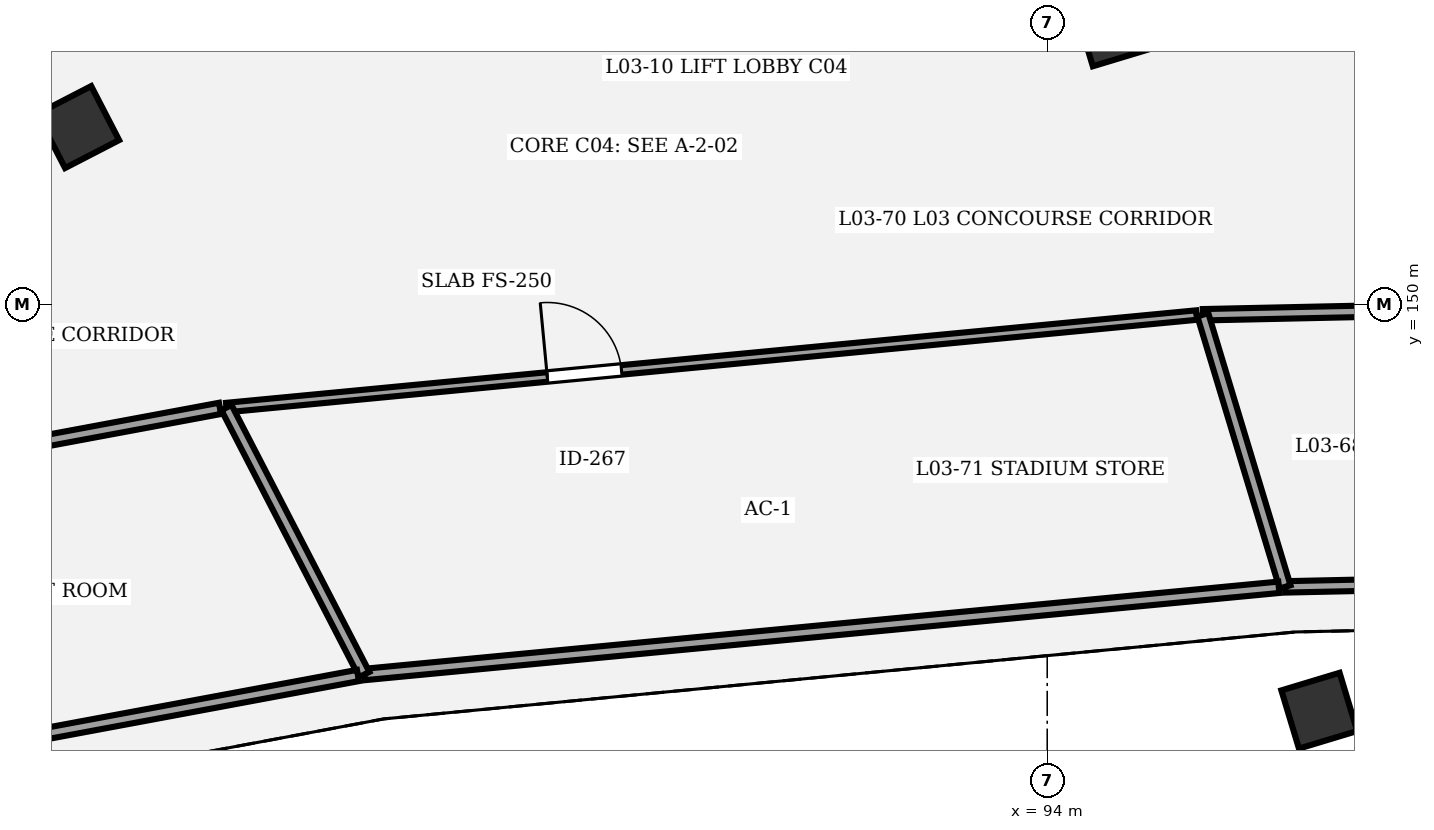
"""IFC4 building model, lengths in metres.
Left out: names, types, materials, properties, quantities, classifications, styles, units other than length and angle.
Written with IfcOpenShell. Run it as: python <this file> out.ifc"""

import sys

from ifc_helpers import new_model, si_unit, direction, frame, frame_2d, origin, origin_2d, place, context, subcontext, project, spatial, rectangle, extrude, element, fill, save


model = new_model("IFC4")
c1 = context("Model", 3, precision=1e-05, world=origin(), true_north=direction((0.0, 1.0)))
c2 = subcontext(c1, "Body", "Model", "MODEL_VIEW")
j1 = project(units=[si_unit("LENGTHUNIT", "METRE"), si_unit("PLANEANGLEUNIT", "RADIAN")], contexts=[c1])
p1 = place(None, origin())
s1 = spatial("IfcSite", under=j1, at=p1, CompositionType="ELEMENT")
p2 = place(p1, origin())
s2 = spatial("IfcBuilding", under=s1, at=p2, CompositionType="ELEMENT")
p3 = place(p2, frame((0.0, 0.0, 14.7)))
s3 = spatial("IfcBuildingStorey", under=s2, at=p3, CompositionType="ELEMENT", Elevation=14.7)
p4 = place(p3, frame((97.58, 144.657, 0.0), z_axis=(0.0, 0.0, 1.0), x_axis=(-0.289198876314, 0.957269037387, 0.0)))
e1 = element("IfcColumn", 1, at=p4, inside=s3, PredefinedType="COLUMN", context=c2, shape_type="SweptSolid", body=[
    extrude(rectangle(XDim=0.8, YDim=0.8, at=origin_2d()), origin(), (0.0, 0.0, 1.0), 2.85),
])
for number, where, z_axis, x_axis in (
    (2, (94.867, 153.634, 0.0), (0.0, 0.0, 1.0), (-0.289, 0.957, 0.0)),
    (3, (81.25, 152.335, 0.0), (0.0, 0.0, 1.0), (-0.459, 0.888, 0.0)),
):
    element("IfcColumn", number, at=place(p3, frame(where, z_axis=z_axis, x_axis=x_axis)), inside=s3, PredefinedType="COLUMN", context=c2, shape_type="SweptSolid", body=[
        extrude(rectangle(XDim=0.8, YDim=0.8, at=origin_2d()), origin(), (0.0, 0.0, 1.0), 4.5),
    ])
p5 = place(p3, frame((96.047, 149.866, 0.0), z_axis=(0.0, 0.0, 1.0), x_axis=(0.999768266483, 0.021527037261, 0.0)))
e4 = element("IfcWall", 4, at=p5, inside=s3, PredefinedType="PARTITIONING", context=c2, shape_type="SweptSolid", body=[
    extrude(rectangle(XDim=18.917, YDim=0.15, at=frame_2d((9.458, 0.0))), origin(), (0.0, 0.0, 1.0), 3.25),
])
p6 = place(p5, frame((9.009, 0.0, 0.0)))
e5 = element("IfcOpeningElement", 5, at=p6, cuts=e4, PredefinedType="OPENING", context=c2, shape_type="SweptSolid", body=[
    extrude(rectangle(XDim=0.9, YDim=2.2, at=frame_2d((0.45, 1.1))), frame((0.0, 0.085, 0.0), z_axis=(0.0, -1.0, 0.0), x_axis=(1.0, 0.0, 0.0)), (0.0, 0.0, 1.0), 0.17),
])
p7 = place(p3, frame((83.201, 148.645, 0.0), z_axis=(0.0, 0.0, 1.0), x_axis=(0.995485111947, 0.094917816515, 0.0)))
e6 = element("IfcWall", 6, at=p7, inside=s3, PredefinedType="PARTITIONING", context=c2, shape_type="SweptSolid", body=[
    extrude(rectangle(XDim=12.822, YDim=0.125, at=frame_2d((6.411, 0.0))), origin(), (0.0, 0.0, 1.0), 3.25),
])
p8 = place(p7, frame((4.241, 0.0, 0.0)))
e7 = element("IfcOpeningElement", 7, at=p8, cuts=e6, PredefinedType="OPENING", context=c2, shape_type="SweptSolid", body=[
    extrude(rectangle(XDim=0.98, YDim=2.2, at=frame_2d((0.49, 1.1))), frame((0.0, 0.073, 0.0), z_axis=(0.0, -1.0, 0.0), x_axis=(1.0, 0.0, 0.0)), (0.0, 0.0, 1.0), 0.145),
])
p9 = place(p3, frame((72.268, 146.614, 0.0), z_axis=(0.0, 0.0, 1.0), x_axis=(0.983097372707, 0.183083466695, 0.0)))
e8 = element("IfcWall", 8, at=p9, inside=s3, PredefinedType="PARTITIONING", context=c2, shape_type="SweptSolid", body=[
    extrude(rectangle(XDim=11.035, YDim=0.15, at=frame_2d((5.517, 0.0))), origin(), (0.0, 0.0, 1.0), 3.25),
])
p10 = place(p9, frame((5.007, 0.0, 0.0)))
e9 = element("IfcOpeningElement", 9, at=p10, cuts=e8, PredefinedType="OPENING", context=c2, shape_type="SweptSolid", body=[
    extrude(rectangle(XDim=1.02, YDim=2.2, at=frame_2d((0.51, 1.1))), frame((0.0, 0.085, 0.0), z_axis=(0.0, -1.0, 0.0), x_axis=(1.0, 0.0, 0.0)), (0.0, 0.0, 1.0), 0.17),
])
p11 = place(p3, frame((114.96, 146.67, 0.0), z_axis=(0.0, 0.0, 1.0), x_axis=(-0.999768146144, -0.02153262537, 0.0)))
e10 = element("IfcWall", 10, at=p11, inside=s3, PredefinedType="PARTITIONING", context=c2, shape_type="SweptSolid", body=[
    extrude(rectangle(XDim=17.835, YDim=0.15, at=frame_2d((8.917, 0.0))), origin(), (0.0, 0.0, 1.0), 3.25),
])
p12 = place(p3, frame((97.129, 146.286, 0.0), z_axis=(0.0, 0.0, 1.0), x_axis=(-0.289233717162, 0.957258510987, 0.0)))
e11 = element("IfcWall", 11, at=p12, inside=s3, PredefinedType="PARTITIONING", context=c2, shape_type="SweptSolid", body=[
    extrude(rectangle(XDim=3.74, YDim=0.15, at=frame_2d((1.87, 0.0))), origin(), (0.0, 0.0, 1.0), 3.25),
])
p13 = place(p3, frame((97.047, 146.281, 0.0), z_axis=(0.0, 0.0, 1.0), x_axis=(-0.995483481464, -0.094934915244, 0.0)))
e12 = element("IfcWall", 12, at=p13, inside=s3, PredefinedType="PARTITIONING", context=c2, shape_type="SweptSolid", body=[
    extrude(rectangle(XDim=12.087, YDim=0.15, at=frame_2d((6.043, 0.0))), origin(), (0.0, 0.0, 1.0), 3.25),
])
p14 = place(p3, frame((85.015, 145.133, 0.0), z_axis=(0.0, 0.0, 1.0), x_axis=(-0.458959114062, 0.888457388747, 0.0)))
e13 = element("IfcWall", 13, at=p14, inside=s3, PredefinedType="PARTITIONING", context=c2, shape_type="SweptSolid", body=[
    extrude(rectangle(XDim=3.953, YDim=0.15, at=frame_2d((1.977, 0.0))), origin(), (0.0, 0.0, 1.0), 3.25),
])
p15 = place(p3, frame((84.932, 145.121, 0.0), z_axis=(0.0, 0.0, 1.0), x_axis=(-0.983096264982, -0.183089414709, 0.0)))
e14 = element("IfcWall", 14, at=p15, inside=s3, PredefinedType="PARTITIONING", context=c2, shape_type="SweptSolid", body=[
    extrude(rectangle(XDim=10.401, YDim=0.15, at=frame_2d((5.2, 0.0))), origin(), (0.0, 0.0, 1.0), 3.25),
])
p16 = place(p8, origin())
e15 = element("IfcDoor", 15, at=p16, inside=s3, OperationType="SINGLE_SWING_LEFT", PredefinedType="DOOR", context=c2, shape_type="SweptSolid", body=[
    extrude(rectangle(XDim=0.98, YDim=2.2, at=frame_2d((0.49, 1.1))), frame((0.0, 0.025, 0.0), z_axis=(0.0, -1.0, 0.0), x_axis=(1.0, 0.0, 0.0)), (0.0, 0.0, 1.0), 0.05),
])
fill(e7, e15)
save(model, sys.argv[1])
